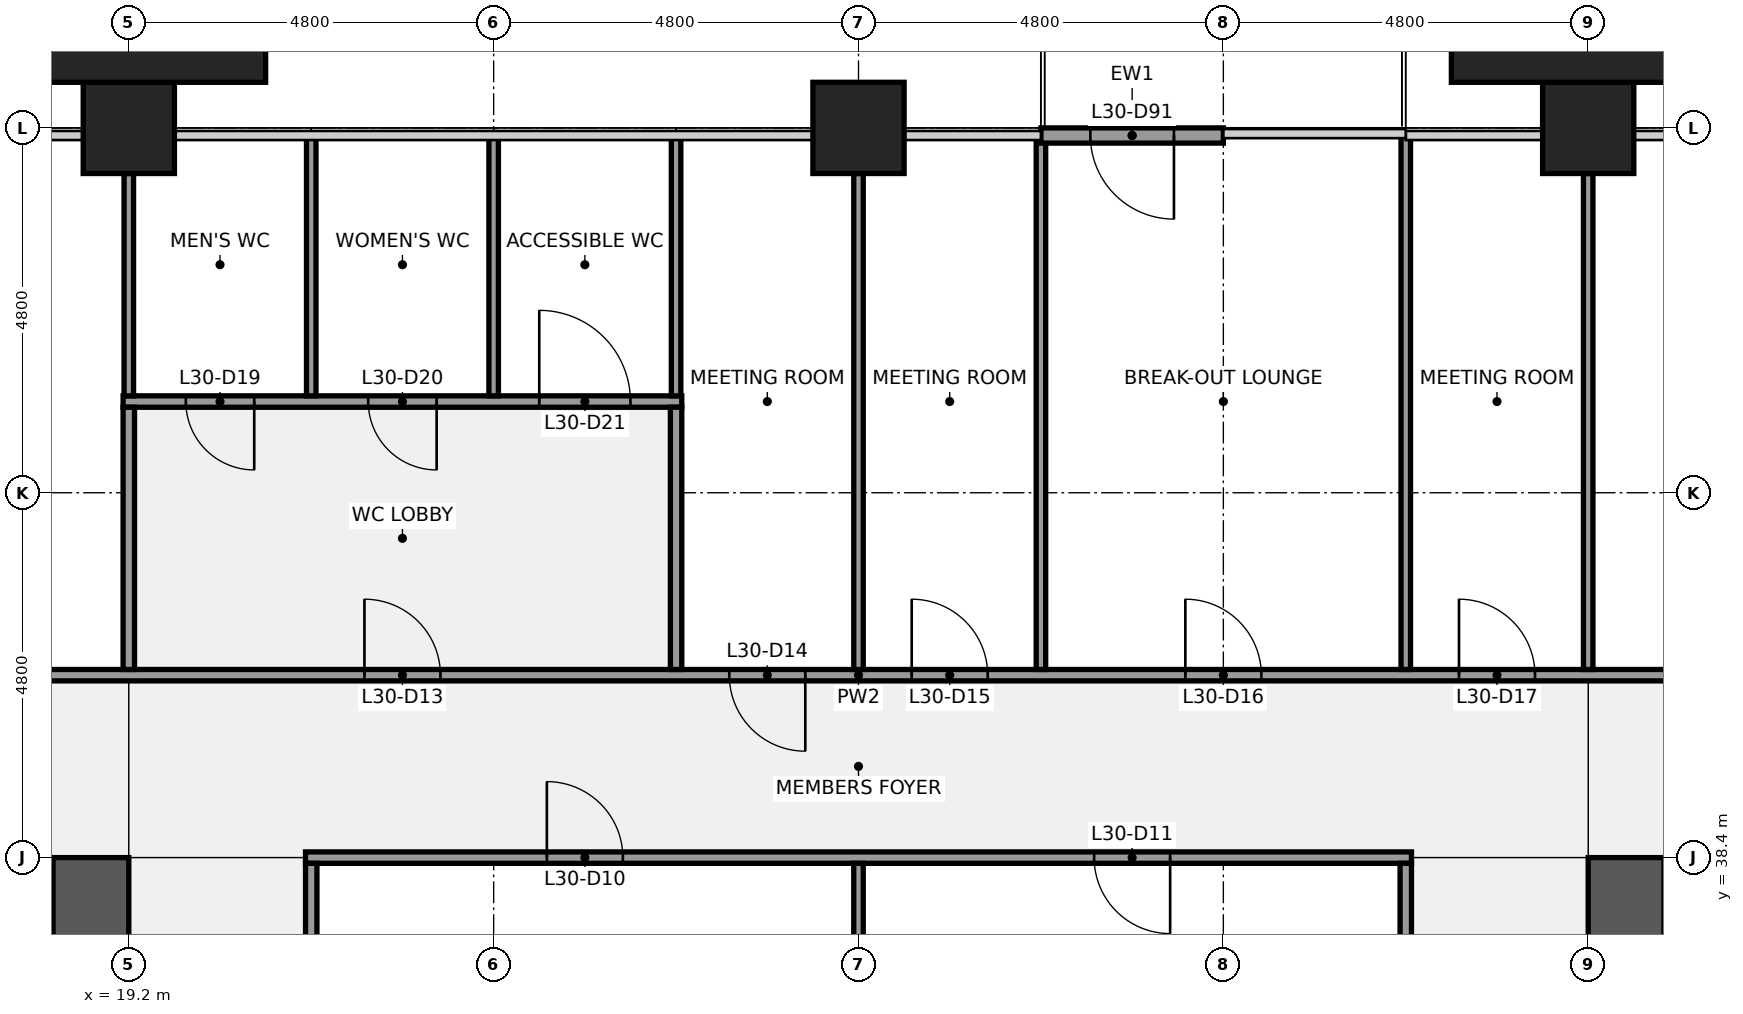
"""IFC4 building model, lengths in metres.
Left out: names, types, materials, properties, quantities, classifications, styles, units other than length and angle.
Written with IfcOpenShell. Run it as: python <this file> out.ifc"""

import sys

from ifc_helpers import new_model, si_unit, direction, frame, frame_2d, origin, origin_2d, place, context, subcontext, project, spatial, rectangle, extrude, element, fill, save


model = new_model("IFC4")
c1 = context("Model", 3, precision=1e-05, world=origin(), true_north=direction((0.0, 1.0)))
c2 = subcontext(c1, "Body", "Model", "MODEL_VIEW")
j1 = project(units=[si_unit("LENGTHUNIT", "METRE"), si_unit("PLANEANGLEUNIT", "RADIAN")], contexts=[c1])
p1 = place(None, origin())
s1 = spatial("IfcSite", under=j1, at=p1, CompositionType="ELEMENT")
p2 = place(p1, origin())
s2 = spatial("IfcBuilding", under=s1, at=p2, CompositionType="ELEMENT")
p3 = place(p2, frame((0.0, 0.0, 140.1)))
s3 = spatial("IfcBuildingStorey", under=s2, at=p3, CompositionType="ELEMENT", Elevation=140.1)
for number, where, z_axis, x_axis in (
    (1, (19.2, 48.0, 0.0), (0.0, 0.0, 1.0), (1.0, 0.0, 0.0)),
    (2, (28.8, 48.0, 0.0), (0.0, 0.0, 1.0), (1.0, 0.0, 0.0)),
    (3, (38.4, 48.0, 0.0), (0.0, 0.0, 1.0), (1.0, 0.0, 0.0)),
):
    element("IfcColumn", number, at=place(p3, frame(where, z_axis=z_axis, x_axis=x_axis)), inside=s3, PredefinedType="COLUMN", context=c2, shape_type="SweptSolid", body=[
        extrude(rectangle(XDim=1.2, YDim=1.2, at=origin_2d()), origin(), (0.0, 0.0, 1.0), 4.0),
    ])
p4 = place(p3, frame((18.7, 38.4, 0.0), z_axis=(0.0, 0.0, 1.0), x_axis=(0.0, -1.0, 0.0)))
e4 = element("IfcWall", 4, at=p4, inside=s3, PredefinedType="SHEAR", context=c2, shape_type="SweptSolid", body=[
    extrude(rectangle(XDim=28.8, YDim=1.0, at=frame_2d((14.4, 0.0))), origin(), (0.0, 0.0, 1.0), 3.84),
])
p5 = place(p4, frame((18.3, 0.0, 0.0)))
e5 = element("IfcOpeningElement", 5, at=p5, cuts=e4, PredefinedType="OPENING", context=c2, shape_type="SweptSolid", body=[
    extrude(rectangle(XDim=1.8, YDim=2.1, at=frame_2d((0.9, 1.05))), frame((0.0, 0.51, 0.0), z_axis=(0.0, -1.0, 0.0), x_axis=(1.0, 0.0, 0.0)), (0.0, 0.0, 1.0), 1.02),
])
p6 = place(p4, frame((8.7, 0.0, 0.0)))
e6 = element("IfcOpeningElement", 6, at=p6, cuts=e4, PredefinedType="OPENING", context=c2, shape_type="SweptSolid", body=[
    extrude(rectangle(XDim=1.8, YDim=2.1, at=frame_2d((0.9, 1.05))), frame((0.0, 0.51, 0.0), z_axis=(0.0, -1.0, 0.0), x_axis=(1.0, 0.0, 0.0)), (0.0, 0.0, 1.0), 1.02),
])
p7 = place(p3, frame((38.9, 9.6, 0.0), z_axis=(0.0, 0.0, 1.0), x_axis=(0.0, 1.0, 0.0)))
e7 = element("IfcWall", 7, at=p7, inside=s3, PredefinedType="SHEAR", context=c2, shape_type="SweptSolid", body=[
    extrude(rectangle(XDim=28.8, YDim=1.0, at=frame_2d((14.4, 0.0))), origin(), (0.0, 0.0, 1.0), 3.84),
])
p8 = place(p7, frame((8.7, 0.0, 0.0)))
e8 = element("IfcOpeningElement", 8, at=p8, cuts=e7, PredefinedType="OPENING", context=c2, shape_type="SweptSolid", body=[
    extrude(rectangle(XDim=1.8, YDim=2.1, at=frame_2d((0.9, 1.05))), frame((0.0, 0.51, 0.0), z_axis=(0.0, -1.0, 0.0), x_axis=(1.0, 0.0, 0.0)), (0.0, 0.0, 1.0), 1.02),
])
p9 = place(p7, frame((18.3, 0.0, 0.0)))
e9 = element("IfcOpeningElement", 9, at=p9, cuts=e7, PredefinedType="OPENING", context=c2, shape_type="SweptSolid", body=[
    extrude(rectangle(XDim=1.8, YDim=2.1, at=frame_2d((0.9, 1.05))), frame((0.0, 0.51, 0.0), z_axis=(0.0, -1.0, 0.0), x_axis=(1.0, 0.0, 0.0)), (0.0, 0.0, 1.0), 1.02),
])
p10 = place(p3, frame((21.525, 38.4, 0.0), z_axis=(0.0, 0.0, 1.0), x_axis=(1.0, 0.0, 0.0)))
e10 = element("IfcWall", 10, at=p10, inside=s3, PredefinedType="PARTITIONING", context=c2, shape_type="SweptSolid", body=[
    extrude(rectangle(XDim=14.55, YDim=0.15, at=frame_2d((7.275, 0.0))), origin(), (0.0, 0.0, 1.0), 2.936),
])
p11 = place(p10, frame((3.175, 0.0, 0.0)))
e11 = element("IfcOpeningElement", 11, at=p11, cuts=e10, PredefinedType="OPENING", context=c2, shape_type="SweptSolid", body=[
    extrude(rectangle(XDim=1.0, YDim=2.1, at=frame_2d((0.5, 1.05))), frame((0.0, 0.085, 0.0), z_axis=(0.0, -1.0, 0.0), x_axis=(1.0, 0.0, 0.0)), (0.0, 0.0, 1.0), 0.17),
])
p12 = place(p10, frame((10.375, 0.0, 0.0)))
e12 = element("IfcOpeningElement", 12, at=p12, cuts=e10, PredefinedType="OPENING", context=c2, shape_type="SweptSolid", body=[
    extrude(rectangle(XDim=1.0, YDim=2.1, at=frame_2d((0.5, 1.05))), frame((0.0, 0.085, 0.0), z_axis=(0.0, -1.0, 0.0), x_axis=(1.0, 0.0, 0.0)), (0.0, 0.0, 1.0), 0.17),
])
p13 = place(p3, frame((9.525, 40.8, 0.0), z_axis=(0.0, 0.0, 1.0), x_axis=(1.0, 0.0, 0.0)))
e13 = element("IfcWall", 13, at=p13, inside=s3, PredefinedType="PARTITIONING", context=c2, shape_type="SweptSolid", body=[
    extrude(rectangle(XDim=38.55, YDim=0.15, at=frame_2d((19.275, 0.0))), origin(), (0.0, 0.0, 1.0), 2.936),
])
p14 = place(p13, frame((4.375, 0.0, 0.0)))
e14 = element("IfcOpeningElement", 14, at=p14, cuts=e13, PredefinedType="OPENING", context=c2, shape_type="SweptSolid", body=[
    extrude(rectangle(XDim=1.0, YDim=2.1, at=frame_2d((0.5, 1.05))), frame((0.0, 0.085, 0.0), z_axis=(0.0, -1.0, 0.0), x_axis=(1.0, 0.0, 0.0)), (0.0, 0.0, 1.0), 0.17),
])
p15 = place(p13, frame((12.775, 0.0, 0.0)))
e15 = element("IfcOpeningElement", 15, at=p15, cuts=e13, PredefinedType="OPENING", context=c2, shape_type="SweptSolid", body=[
    extrude(rectangle(XDim=1.0, YDim=2.1, at=frame_2d((0.5, 1.05))), frame((0.0, 0.085, 0.0), z_axis=(0.0, -1.0, 0.0), x_axis=(1.0, 0.0, 0.0)), (0.0, 0.0, 1.0), 0.17),
])
p16 = place(p13, frame((17.575, 0.0, 0.0)))
e16 = element("IfcOpeningElement", 16, at=p16, cuts=e13, PredefinedType="OPENING", context=c2, shape_type="SweptSolid", body=[
    extrude(rectangle(XDim=1.0, YDim=2.1, at=frame_2d((0.5, 1.05))), frame((0.0, 0.085, 0.0), z_axis=(0.0, -1.0, 0.0), x_axis=(1.0, 0.0, 0.0)), (0.0, 0.0, 1.0), 0.17),
])
p17 = place(p13, frame((19.975, 0.0, 0.0)))
e17 = element("IfcOpeningElement", 17, at=p17, cuts=e13, PredefinedType="OPENING", context=c2, shape_type="SweptSolid", body=[
    extrude(rectangle(XDim=1.0, YDim=2.1, at=frame_2d((0.5, 1.05))), frame((0.0, 0.085, 0.0), z_axis=(0.0, -1.0, 0.0), x_axis=(1.0, 0.0, 0.0)), (0.0, 0.0, 1.0), 0.17),
])
p18 = place(p13, frame((23.575, 0.0, 0.0)))
e18 = element("IfcOpeningElement", 18, at=p18, cuts=e13, PredefinedType="OPENING", context=c2, shape_type="SweptSolid", body=[
    extrude(rectangle(XDim=1.0, YDim=2.1, at=frame_2d((0.5, 1.05))), frame((0.0, 0.085, 0.0), z_axis=(0.0, -1.0, 0.0), x_axis=(1.0, 0.0, 0.0)), (0.0, 0.0, 1.0), 0.17),
])
p19 = place(p13, frame((27.175, 0.0, 0.0)))
e19 = element("IfcOpeningElement", 19, at=p19, cuts=e13, PredefinedType="OPENING", context=c2, shape_type="SweptSolid", body=[
    extrude(rectangle(XDim=1.0, YDim=2.1, at=frame_2d((0.5, 1.05))), frame((0.0, 0.085, 0.0), z_axis=(0.0, -1.0, 0.0), x_axis=(1.0, 0.0, 0.0)), (0.0, 0.0, 1.0), 0.17),
])
p20 = place(p13, frame((33.175, 0.0, 0.0)))
e20 = element("IfcOpeningElement", 20, at=p20, cuts=e13, PredefinedType="OPENING", context=c2, shape_type="SweptSolid", body=[
    extrude(rectangle(XDim=1.0, YDim=2.1, at=frame_2d((0.5, 1.05))), frame((0.0, 0.085, 0.0), z_axis=(0.0, -1.0, 0.0), x_axis=(1.0, 0.0, 0.0)), (0.0, 0.0, 1.0), 0.17),
])
p21 = place(p3, frame((19.125, 44.4, 0.0), z_axis=(0.0, 0.0, 1.0), x_axis=(1.0, 0.0, 0.0)))
e21 = element("IfcWall", 21, at=p21, inside=s3, PredefinedType="PARTITIONING", context=c2, shape_type="SweptSolid", body=[
    extrude(rectangle(XDim=7.35, YDim=0.15, at=frame_2d((3.675, 0.0))), origin(), (0.0, 0.0, 1.0), 2.936),
])
p22 = place(p21, frame((0.825, 0.0, 0.0)))
e22 = element("IfcOpeningElement", 22, at=p22, cuts=e21, PredefinedType="OPENING", context=c2, shape_type="SweptSolid", body=[
    extrude(rectangle(XDim=0.9, YDim=2.1, at=frame_2d((0.45, 1.05))), frame((0.0, 0.085, 0.0), z_axis=(0.0, -1.0, 0.0), x_axis=(1.0, 0.0, 0.0)), (0.0, 0.0, 1.0), 0.17),
])
p23 = place(p21, frame((3.225, 0.0, 0.0)))
e23 = element("IfcOpeningElement", 23, at=p23, cuts=e21, PredefinedType="OPENING", context=c2, shape_type="SweptSolid", body=[
    extrude(rectangle(XDim=0.9, YDim=2.1, at=frame_2d((0.45, 1.05))), frame((0.0, 0.085, 0.0), z_axis=(0.0, -1.0, 0.0), x_axis=(1.0, 0.0, 0.0)), (0.0, 0.0, 1.0), 0.17),
])
p24 = place(p21, frame((5.475, 0.0, 0.0)))
e24 = element("IfcOpeningElement", 24, at=p24, cuts=e21, PredefinedType="OPENING", context=c2, shape_type="SweptSolid", body=[
    extrude(rectangle(XDim=1.2, YDim=2.1, at=frame_2d((0.6, 1.05))), frame((0.0, 0.085, 0.0), z_axis=(0.0, -1.0, 0.0), x_axis=(1.0, 0.0, 0.0)), (0.0, 0.0, 1.0), 0.17),
])
p25 = place(p3, frame((19.2, 44.475, 0.0), z_axis=(0.0, 0.0, 1.0), x_axis=(0.0, 1.0, 0.0)))
e25 = element("IfcWall", 25, at=p25, inside=s3, PredefinedType="PARTITIONING", context=c2, shape_type="SweptSolid", body=[
    extrude(rectangle(XDim=2.925, YDim=0.125, at=frame_2d((1.462, 0.0))), origin(), (0.0, 0.0, 1.0), 2.936),
])
p26 = place(p3, frame((19.2, 40.875, 0.0), z_axis=(0.0, 0.0, 1.0), x_axis=(0.0, 1.0, 0.0)))
e26 = element("IfcWall", 26, at=p26, inside=s3, PredefinedType="PARTITIONING", context=c2, shape_type="SweptSolid", body=[
    extrude(rectangle(XDim=3.45, YDim=0.15, at=frame_2d((1.725, 0.0))), origin(), (0.0, 0.0, 1.0), 2.936),
])
p27 = place(p3, frame((21.6, 44.475, 0.0), z_axis=(0.0, 0.0, 1.0), x_axis=(0.0, 1.0, 0.0)))
e27 = element("IfcWall", 27, at=p27, inside=s3, PredefinedType="PARTITIONING", context=c2, shape_type="SweptSolid", body=[
    extrude(rectangle(XDim=3.425, YDim=0.125, at=frame_2d((1.712, 0.0))), origin(), (0.0, 0.0, 1.0), 2.936),
])
p28 = place(p3, frame((21.6, 33.675, 0.0), z_axis=(0.0, 0.0, 1.0), x_axis=(0.0, 1.0, 0.0)))
e28 = element("IfcWall", 28, at=p28, inside=s3, PredefinedType="PARTITIONING", context=c2, shape_type="SweptSolid", body=[
    extrude(rectangle(XDim=4.65, YDim=0.15, at=frame_2d((2.325, 0.0))), origin(), (0.0, 0.0, 1.0), 2.936),
])
for number, where, z_axis, x_axis in (
    (29, (24.0, 44.475, 0.0), (0.0, 0.0, 1.0), (0.0, 1.0, 0.0)),
    (30, (26.4, 44.475, 0.0), (0.0, 0.0, 1.0), (0.0, 1.0, 0.0)),
):
    element("IfcWall", number, at=place(p3, frame(where, z_axis=z_axis, x_axis=x_axis)), inside=s3, PredefinedType="PARTITIONING", context=c2, shape_type="SweptSolid", body=[
        extrude(rectangle(XDim=3.425, YDim=0.125, at=frame_2d((1.712, 0.0))), origin(), (0.0, 0.0, 1.0), 2.936),
    ])
p29 = place(p3, frame((26.4, 40.875, 0.0), z_axis=(0.0, 0.0, 1.0), x_axis=(0.0, 1.0, 0.0)))
e31 = element("IfcWall", 31, at=p29, inside=s3, PredefinedType="PARTITIONING", context=c2, shape_type="SweptSolid", body=[
    extrude(rectangle(XDim=3.45, YDim=0.15, at=frame_2d((1.725, 0.0))), origin(), (0.0, 0.0, 1.0), 2.936),
])
p30 = place(p3, frame((28.8, 33.663, 0.0), z_axis=(0.0, 0.0, 1.0), x_axis=(0.0, 1.0, 0.0)))
e32 = element("IfcWall", 32, at=p30, inside=s3, PredefinedType="PARTITIONING", context=c2, shape_type="SweptSolid", body=[
    extrude(rectangle(XDim=4.662, YDim=0.125, at=frame_2d((2.331, 0.0))), origin(), (0.0, 0.0, 1.0), 2.936),
])
p31 = place(p3, frame((28.8, 40.875, 0.0), z_axis=(0.0, 0.0, 1.0), x_axis=(0.0, 1.0, 0.0)))
e33 = element("IfcWall", 33, at=p31, inside=s3, PredefinedType="PARTITIONING", context=c2, shape_type="SweptSolid", body=[
    extrude(rectangle(XDim=6.525, YDim=0.125, at=frame_2d((3.262, 0.0))), origin(), (0.0, 0.0, 1.0), 2.936),
])
for number, where, z_axis, x_axis in (
    (34, (31.2, 40.875, 0.0), (0.0, 0.0, 1.0), (0.0, 1.0, 0.0)),
    (35, (36.0, 40.875, 0.0), (0.0, 0.0, 1.0), (0.0, 1.0, 0.0)),
):
    element("IfcWall", number, at=place(p3, frame(where, z_axis=z_axis, x_axis=x_axis)), inside=s3, PredefinedType="PARTITIONING", context=c2, shape_type="SweptSolid", body=[
        extrude(rectangle(XDim=7.025, YDim=0.125, at=frame_2d((3.512, 0.0))), origin(), (0.0, 0.0, 1.0), 2.936),
    ])
p32 = place(p3, frame((36.0, 33.675, 0.0), z_axis=(0.0, 0.0, 1.0), x_axis=(0.0, 1.0, 0.0)))
e36 = element("IfcWall", 36, at=p32, inside=s3, PredefinedType="PARTITIONING", context=c2, shape_type="SweptSolid", body=[
    extrude(rectangle(XDim=4.65, YDim=0.15, at=frame_2d((2.325, 0.0))), origin(), (0.0, 0.0, 1.0), 2.936),
])
p33 = place(p3, frame((38.4, 40.875, 0.0), z_axis=(0.0, 0.0, 1.0), x_axis=(0.0, 1.0, 0.0)))
e37 = element("IfcWall", 37, at=p33, inside=s3, PredefinedType="PARTITIONING", context=c2, shape_type="SweptSolid", body=[
    extrude(rectangle(XDim=6.525, YDim=0.125, at=frame_2d((3.262, 0.0))), origin(), (0.0, 0.0, 1.0), 2.936),
])
p34 = place(p3, frame((33.6, 47.9, 0.0), z_axis=(0.0, 0.0, 1.0), x_axis=(-1.0, 0.0, 0.0)))
e38 = element("IfcWall", 38, at=p34, inside=s3, PredefinedType="SOLIDWALL", context=c2, shape_type="SweptSolid", body=[
    extrude(rectangle(XDim=2.4, YDim=0.2, at=frame_2d((1.2, 0.0))), origin(), (0.0, 0.0, 1.0), 3.314),
])
p35 = place(p34, frame((0.65, 0.0, 0.0)))
e39 = element("IfcOpeningElement", 39, at=p35, cuts=e38, PredefinedType="OPENING", context=c2, shape_type="SweptSolid", body=[
    extrude(rectangle(XDim=1.1, YDim=2.1, at=frame_2d((0.55, 1.05))), frame((0.0, 0.11, 0.0), z_axis=(0.0, -1.0, 0.0), x_axis=(1.0, 0.0, 0.0)), (0.0, 0.0, 1.0), 0.22),
])
for number, where, z_axis, x_axis in (
    (40, (19.2, 49.05, 0.0), (0.0, 0.0, 1.0), (1.0, 0.0, 0.0)),
    (41, (38.4, 49.05, 0.0), (0.0, 0.0, 1.0), (1.0, 0.0, 0.0)),
):
    element("IfcColumn", number, at=place(p3, frame(where, z_axis=z_axis, x_axis=x_axis)), inside=s3, PredefinedType="PILASTER", context=c2, shape_type="SweptSolid", body=[
        extrude(rectangle(XDim=3.6, YDim=0.9, at=origin_2d()), origin(), (0.0, 0.0, 1.0), 4.0),
    ])
p36 = place(p11, origin())
e42 = element("IfcDoor", 42, at=p36, inside=s3, OperationType="SINGLE_SWING_LEFT", PredefinedType="DOOR", context=c2, shape_type="SweptSolid", body=[
    extrude(rectangle(XDim=1.0, YDim=2.1, at=frame_2d((0.5, 1.05))), frame((0.0, 0.025, 0.0), z_axis=(0.0, -1.0, 0.0), x_axis=(1.0, 0.0, 0.0)), (0.0, 0.0, 1.0), 0.05),
])
fill(e11, e42)
p37 = place(p12, origin())
e43 = element("IfcDoor", 43, at=p37, inside=s3, OperationType="SINGLE_SWING_RIGHT", PredefinedType="DOOR", context=c2, shape_type="SweptSolid", body=[
    extrude(rectangle(XDim=1.0, YDim=2.1, at=frame_2d((0.5, 1.05))), frame((0.0, 0.025, 0.0), z_axis=(0.0, -1.0, 0.0), x_axis=(1.0, 0.0, 0.0)), (0.0, 0.0, 1.0), 0.05),
])
fill(e12, e43)
p38 = place(p15, origin())
e44 = element("IfcDoor", 44, at=p38, inside=s3, OperationType="SINGLE_SWING_LEFT", PredefinedType="DOOR", context=c2, shape_type="SweptSolid", body=[
    extrude(rectangle(XDim=1.0, YDim=2.1, at=frame_2d((0.5, 1.05))), frame((0.0, 0.025, 0.0), z_axis=(0.0, -1.0, 0.0), x_axis=(1.0, 0.0, 0.0)), (0.0, 0.0, 1.0), 0.05),
])
fill(e15, e44)
p39 = place(p16, origin())
e45 = element("IfcDoor", 45, at=p39, inside=s3, OperationType="SINGLE_SWING_RIGHT", PredefinedType="DOOR", context=c2, shape_type="SweptSolid", body=[
    extrude(rectangle(XDim=1.0, YDim=2.1, at=frame_2d((0.5, 1.05))), frame((0.0, 0.025, 0.0), z_axis=(0.0, -1.0, 0.0), x_axis=(1.0, 0.0, 0.0)), (0.0, 0.0, 1.0), 0.05),
])
fill(e16, e45)
p40 = place(p17, origin())
e46 = element("IfcDoor", 46, at=p40, inside=s3, OperationType="SINGLE_SWING_LEFT", PredefinedType="DOOR", context=c2, shape_type="SweptSolid", body=[
    extrude(rectangle(XDim=1.0, YDim=2.1, at=frame_2d((0.5, 1.05))), frame((0.0, 0.025, 0.0), z_axis=(0.0, -1.0, 0.0), x_axis=(1.0, 0.0, 0.0)), (0.0, 0.0, 1.0), 0.05),
])
fill(e17, e46)
p41 = place(p18, origin())
e47 = element("IfcDoor", 47, at=p41, inside=s3, OperationType="SINGLE_SWING_LEFT", PredefinedType="DOOR", context=c2, shape_type="SweptSolid", body=[
    extrude(rectangle(XDim=1.0, YDim=2.1, at=frame_2d((0.5, 1.05))), frame((0.0, 0.025, 0.0), z_axis=(0.0, -1.0, 0.0), x_axis=(1.0, 0.0, 0.0)), (0.0, 0.0, 1.0), 0.05),
])
fill(e18, e47)
p42 = place(p19, origin())
e48 = element("IfcDoor", 48, at=p42, inside=s3, OperationType="SINGLE_SWING_LEFT", PredefinedType="DOOR", context=c2, shape_type="SweptSolid", body=[
    extrude(rectangle(XDim=1.0, YDim=2.1, at=frame_2d((0.5, 1.05))), frame((0.0, 0.025, 0.0), z_axis=(0.0, -1.0, 0.0), x_axis=(1.0, 0.0, 0.0)), (0.0, 0.0, 1.0), 0.05),
])
fill(e19, e48)
p43 = place(p22, origin())
e49 = element("IfcDoor", 49, at=p43, inside=s3, OperationType="SINGLE_SWING_RIGHT", PredefinedType="DOOR", context=c2, shape_type="SweptSolid", body=[
    extrude(rectangle(XDim=0.9, YDim=2.1, at=frame_2d((0.45, 1.05))), frame((0.0, 0.025, 0.0), z_axis=(0.0, -1.0, 0.0), x_axis=(1.0, 0.0, 0.0)), (0.0, 0.0, 1.0), 0.05),
])
fill(e22, e49)
p44 = place(p23, origin())
e50 = element("IfcDoor", 50, at=p44, inside=s3, OperationType="SINGLE_SWING_RIGHT", PredefinedType="DOOR", context=c2, shape_type="SweptSolid", body=[
    extrude(rectangle(XDim=0.9, YDim=2.1, at=frame_2d((0.45, 1.05))), frame((0.0, 0.025, 0.0), z_axis=(0.0, -1.0, 0.0), x_axis=(1.0, 0.0, 0.0)), (0.0, 0.0, 1.0), 0.05),
])
fill(e23, e50)
p45 = place(p24, origin())
e51 = element("IfcDoor", 51, at=p45, inside=s3, OperationType="SINGLE_SWING_LEFT", PredefinedType="DOOR", context=c2, shape_type="SweptSolid", body=[
    extrude(rectangle(XDim=1.2, YDim=2.1, at=frame_2d((0.6, 1.05))), frame((0.0, 0.025, 0.0), z_axis=(0.0, -1.0, 0.0), x_axis=(1.0, 0.0, 0.0)), (0.0, 0.0, 1.0), 0.05),
])
fill(e24, e51)
p46 = place(p35, origin())
e52 = element("IfcDoor", 52, at=p46, inside=s3, OperationType="SINGLE_SWING_LEFT", PredefinedType="DOOR", context=c2, shape_type="SweptSolid", body=[
    extrude(rectangle(XDim=1.1, YDim=2.1, at=frame_2d((0.55, 1.05))), frame((0.0, 0.025, 0.0), z_axis=(0.0, -1.0, 0.0), x_axis=(1.0, 0.0, 0.0)), (0.0, 0.0, 1.0), 0.05),
])
fill(e39, e52)
save(model, sys.argv[1])
